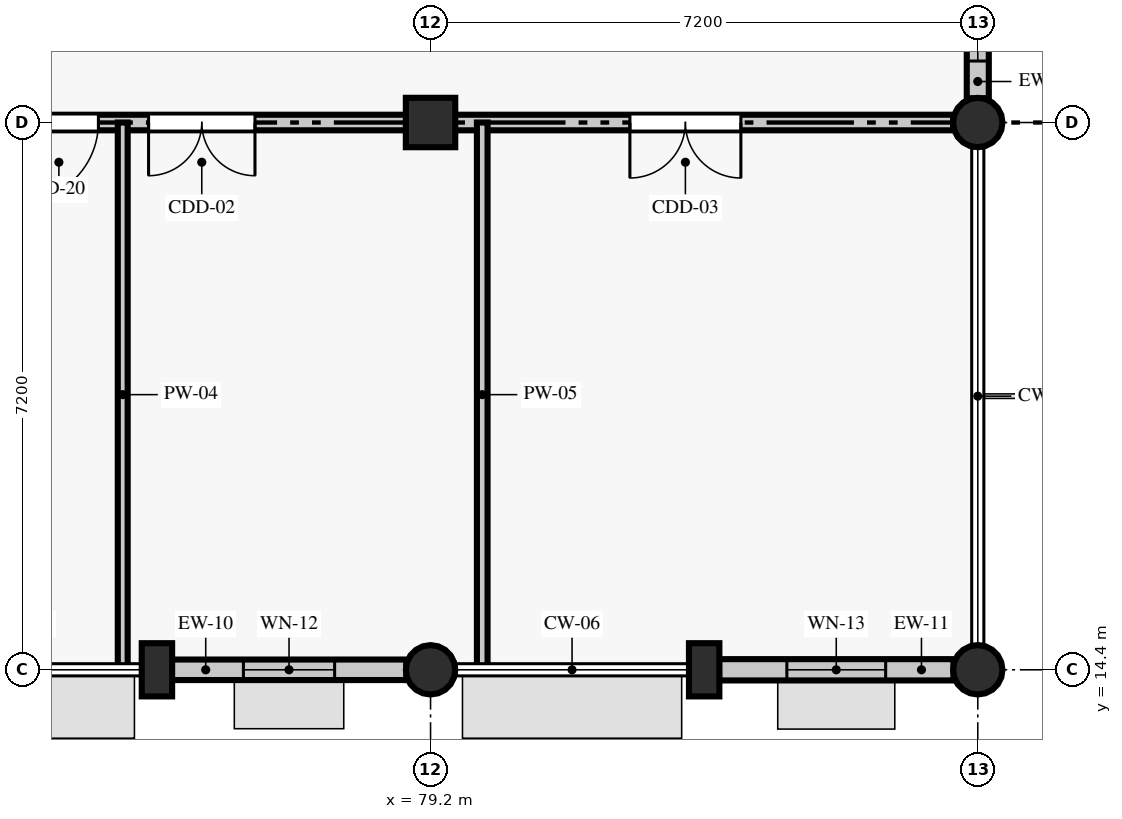
"""IFC4 building model, lengths in metres.
Left out: names, types, materials, properties, quantities, classifications, styles, units other than length and angle.
Written with IfcOpenShell. Run it as: python <this file> out.ifc"""

import sys

from ifc_helpers import new_model, si_unit, direction, frame, frame_2d, origin, origin_2d, place, context, subcontext, project, spatial, rectangle, circle, extrude, element, fill, save


model = new_model("IFC4")
c1 = context("Model", 3, precision=1e-05, world=origin(), true_north=direction((0.0, 1.0)))
c2 = subcontext(c1, "Body", "Model", "MODEL_VIEW")
j1 = project(units=[si_unit("LENGTHUNIT", "METRE"), si_unit("PLANEANGLEUNIT", "RADIAN")], contexts=[c1])
p1 = place(None, origin())
s1 = spatial("IfcSite", under=j1, at=p1, CompositionType="ELEMENT")
p2 = place(p1, origin())
s2 = spatial("IfcBuilding", under=s1, at=p2, CompositionType="ELEMENT")
p3 = place(p2, origin())
s3 = spatial("IfcBuildingStorey", under=s2, at=p3, CompositionType="ELEMENT", Elevation=0.0)
p4 = place(p3, frame((79.2, 14.4, 0.0), z_axis=(0.0, 0.0, 1.0), x_axis=(1.0, 0.0, 0.0)))
e1 = element("IfcColumn", 1, at=p4, inside=s3, PredefinedType="COLUMN", context=c2, shape_type="SweptSolid", body=[
    extrude(circle(Radius=0.325, at=origin_2d()), origin(), (0.0, 0.0, 1.0), 4.51),
])
p5 = place(p3, frame((79.2, 21.6, 0.0), z_axis=(0.0, 0.0, 1.0), x_axis=(1.0, 0.0, 0.0)))
e2 = element("IfcColumn", 2, at=p5, inside=s3, PredefinedType="COLUMN", context=c2, shape_type="SweptSolid", body=[
    extrude(rectangle(XDim=0.65, YDim=0.65, at=origin_2d()), origin(), (0.0, 0.0, 1.0), 4.51),
])
for number, where, z_axis, x_axis in (
    (3, (86.4, 14.4, 0.0), (0.0, 0.0, 1.0), (1.0, 0.0, 0.0)),
    (4, (86.4, 21.6, 0.0), (0.0, 0.0, 1.0), (1.0, 0.0, 0.0)),
):
    element("IfcColumn", number, at=place(p3, frame(where, z_axis=z_axis, x_axis=x_axis)), inside=s3, PredefinedType="COLUMN", context=c2, shape_type="SweptSolid", body=[
        extrude(circle(Radius=0.325, at=origin_2d()), origin(), (0.0, 0.0, 1.0), 4.51),
    ])
for number, where, z_axis, x_axis in (
    (5, (75.6, 14.4, 0.0), (0.0, 0.0, 1.0), (1.0, 0.0, 0.0)),
    (6, (82.8, 14.4, 0.0), (0.0, 0.0, 1.0), (1.0, 0.0, 0.0)),
):
    element("IfcColumn", number, at=place(p3, frame(where, z_axis=z_axis, x_axis=x_axis)), inside=s3, PredefinedType="PILASTER", context=c2, shape_type="SweptSolid", body=[
        extrude(rectangle(XDim=0.4, YDim=0.7, at=origin_2d()), origin(), (0.0, 0.0, 1.0), 4.51),
    ])
p6 = place(p3, frame((75.796, 14.4, 0.0), z_axis=(0.0, 0.0, 1.0), x_axis=(1.0, 0.0, 0.0)))
e7 = element("IfcWall", 7, at=p6, inside=s3, PredefinedType="STANDARD", context=c2, shape_type="SweptSolid", body=[
    extrude(rectangle(XDim=3.084, YDim=0.27, at=frame_2d((1.542, 0.0))), origin(), (0.0, 0.0, 1.0), 2.9),
])
p7 = place(p6, frame((0.942, 0.0, 0.9)))
e8 = element("IfcOpeningElement", 8, at=p7, cuts=e7, PredefinedType="OPENING", context=c2, shape_type="SweptSolid", body=[
    extrude(rectangle(XDim=1.2, YDim=1.42, at=frame_2d((0.6, 0.71))), frame((0.0, 0.145, 0.0), z_axis=(0.0, -1.0, 0.0), x_axis=(1.0, 0.0, 0.0)), (0.0, 0.0, 1.0), 0.29),
])
p8 = place(p3, frame((82.996, 14.4, 0.0), z_axis=(0.0, 0.0, 1.0), x_axis=(1.0, 0.0, 0.0)))
e9 = element("IfcWall", 9, at=p8, inside=s3, PredefinedType="STANDARD", context=c2, shape_type="SweptSolid", body=[
    extrude(rectangle(XDim=3.084, YDim=0.28, at=frame_2d((1.542, 0.0))), origin(), (0.0, 0.0, 1.0), 3.86),
])
p9 = place(p8, frame((0.892, 0.0, 0.9)))
e10 = element("IfcOpeningElement", 10, at=p9, cuts=e9, PredefinedType="OPENING", context=c2, shape_type="SweptSolid", body=[
    extrude(rectangle(XDim=1.3, YDim=1.42, at=frame_2d((0.65, 0.71))), frame((0.0, 0.15, 0.0), z_axis=(0.0, -1.0, 0.0), x_axis=(1.0, 0.0, 0.0)), (0.0, 0.0, 1.0), 0.3),
])
p10 = place(p3, frame((86.4, 21.92, 0.0), z_axis=(0.0, 0.0, 1.0), x_axis=(0.0, 1.0, 0.0)))
e11 = element("IfcWall", 11, at=p10, inside=s3, PredefinedType="STANDARD", context=c2, shape_type="SweptSolid", body=[
    extrude(rectangle(XDim=2.378, YDim=0.29, at=frame_2d((1.189, 0.0))), origin(), (0.0, 0.0, 1.0), 4.51),
])
p11 = place(p10, frame((0.489, 0.0, 0.9)))
e12 = element("IfcOpeningElement", 12, at=p11, cuts=e11, PredefinedType="OPENING", context=c2, shape_type="SweptSolid", body=[
    extrude(rectangle(XDim=1.4, YDim=1.42, at=frame_2d((0.7, 0.71))), frame((0.0, 0.155, 0.0), z_axis=(0.0, -1.0, 0.0), x_axis=(1.0, 0.0, 0.0)), (0.0, 0.0, 1.0), 0.31),
])
p12 = place(p3, frame((50.725, 21.6, 0.0), z_axis=(0.0, 0.0, 1.0), x_axis=(1.0, 0.0, 0.0)))
e13 = element("IfcWall", 13, at=p12, inside=s3, PredefinedType="PARTITIONING", context=c2, shape_type="SweptSolid", body=[
    extrude(rectangle(XDim=35.35, YDim=0.205, at=frame_2d((17.675, 0.0))), origin(), (0.0, 0.0, 1.0), 3.66),
])
p13 = place(p12, frame((2.544, 0.0, 0.0)))
e14 = element("IfcOpeningElement", 14, at=p13, cuts=e13, PredefinedType="OPENING", context=c2, shape_type="SweptSolid", body=[
    extrude(rectangle(XDim=1.34, YDim=2.14, at=frame_2d((0.67, 1.07))), frame((0.0, 0.113, 0.0), z_axis=(0.0, -1.0, 0.0), x_axis=(1.0, 0.0, 0.0)), (0.0, 0.0, 1.0), 0.225),
])
p14 = place(p12, frame((10.122, 0.0, 0.0)))
e15 = element("IfcOpeningElement", 15, at=p14, cuts=e13, PredefinedType="OPENING", context=c2, shape_type="SweptSolid", body=[
    extrude(rectangle(XDim=1.08, YDim=2.18, at=frame_2d((0.54, 1.09))), frame((0.0, 0.113, 0.0), z_axis=(0.0, -1.0, 0.0), x_axis=(1.0, 0.0, 0.0)), (0.0, 0.0, 1.0), 0.225),
])
p15 = place(p12, frame((15.055, 0.0, 0.0)))
e16 = element("IfcOpeningElement", 16, at=p15, cuts=e13, PredefinedType="OPENING", context=c2, shape_type="SweptSolid", body=[
    extrude(rectangle(XDim=0.92, YDim=2.18, at=frame_2d((0.46, 1.09))), frame((0.0, 0.113, 0.0), z_axis=(0.0, -1.0, 0.0), x_axis=(1.0, 0.0, 0.0)), (0.0, 0.0, 1.0), 0.225),
])
p16 = place(p12, frame((17.215, 0.0, 0.0)))
e17 = element("IfcOpeningElement", 17, at=p16, cuts=e13, PredefinedType="OPENING", context=c2, shape_type="SweptSolid", body=[
    extrude(rectangle(XDim=0.94, YDim=2.08, at=frame_2d((0.47, 1.04))), frame((0.0, 0.113, 0.0), z_axis=(0.0, -1.0, 0.0), x_axis=(1.0, 0.0, 0.0)), (0.0, 0.0, 1.0), 0.225),
])
p17 = place(p12, frame((19.465, 0.0, 0.0)))
e18 = element("IfcOpeningElement", 18, at=p17, cuts=e13, PredefinedType="OPENING", context=c2, shape_type="SweptSolid", body=[
    extrude(rectangle(XDim=0.9, YDim=2.08, at=frame_2d((0.45, 1.04))), frame((0.0, 0.113, 0.0), z_axis=(0.0, -1.0, 0.0), x_axis=(1.0, 0.0, 0.0)), (0.0, 0.0, 1.0), 0.225),
])
p18 = place(p12, frame((23.065, 0.0, 0.0)))
e19 = element("IfcOpeningElement", 19, at=p18, cuts=e13, PredefinedType="OPENING", context=c2, shape_type="SweptSolid", body=[
    extrude(rectangle(XDim=1.04, YDim=2.23, at=frame_2d((0.52, 1.115))), frame((0.0, 0.113, 0.0), z_axis=(0.0, -1.0, 0.0), x_axis=(1.0, 0.0, 0.0)), (0.0, 0.0, 1.0), 0.225),
])
p19 = place(p12, frame((24.765, 0.0, 0.0)))
e20 = element("IfcOpeningElement", 20, at=p19, cuts=e13, PredefinedType="OPENING", context=c2, shape_type="SweptSolid", body=[
    extrude(rectangle(XDim=1.4, YDim=2.16, at=frame_2d((0.7, 1.08))), frame((0.0, 0.113, 0.0), z_axis=(0.0, -1.0, 0.0), x_axis=(1.0, 0.0, 0.0)), (0.0, 0.0, 1.0), 0.225),
])
p20 = place(p12, frame((31.098, 0.0, 0.0)))
e21 = element("IfcOpeningElement", 21, at=p20, cuts=e13, PredefinedType="OPENING", context=c2, shape_type="SweptSolid", body=[
    extrude(rectangle(XDim=1.46, YDim=2.18, at=frame_2d((0.73, 1.09))), frame((0.0, 0.113, 0.0), z_axis=(0.0, -1.0, 0.0), x_axis=(1.0, 0.0, 0.0)), (0.0, 0.0, 1.0), 0.225),
])
p21 = place(p3, frame((75.15, 14.44, 0.0), z_axis=(0.0, 0.0, 1.0), x_axis=(0.0, 1.0, 0.0)))
e22 = element("IfcWall", 22, at=p21, inside=s3, PredefinedType="PARTITIONING", context=c2, shape_type="SweptSolid", body=[
    extrude(rectangle(XDim=7.16, YDim=0.13, at=frame_2d((3.58, 0.0))), origin(), (0.0, 0.0, 1.0), 3.66),
])
p22 = place(p3, frame((79.88, 14.44, 0.0), z_axis=(0.0, 0.0, 1.0), x_axis=(0.0, 1.0, 0.0)))
e23 = element("IfcWall", 23, at=p22, inside=s3, PredefinedType="PARTITIONING", context=c2, shape_type="SweptSolid", body=[
    extrude(rectangle(XDim=7.16, YDim=0.14, at=frame_2d((3.58, 0.0))), origin(), (0.0, 0.0, 1.0), 3.66),
])
p23 = place(p7, origin())
e24 = element("IfcWindow", 24, at=p23, inside=s3, PartitioningType="SINGLE_PANEL", PredefinedType="WINDOW", context=c2, shape_type="SweptSolid", body=[
    extrude(rectangle(XDim=1.2, YDim=1.42, at=frame_2d((0.6, 0.71))), frame((0.0, 0.03, 0.0), z_axis=(0.0, -1.0, 0.0), x_axis=(1.0, 0.0, 0.0)), (0.0, 0.0, 1.0), 0.06),
])
fill(e8, e24)
p24 = place(p9, origin())
e25 = element("IfcWindow", 25, at=p24, inside=s3, PartitioningType="SINGLE_PANEL", PredefinedType="WINDOW", context=c2, shape_type="SweptSolid", body=[
    extrude(rectangle(XDim=1.3, YDim=1.42, at=frame_2d((0.65, 0.71))), frame((0.0, 0.03, 0.0), z_axis=(0.0, -1.0, 0.0), x_axis=(1.0, 0.0, 0.0)), (0.0, 0.0, 1.0), 0.06),
])
fill(e10, e25)
p25 = place(p11, origin())
e26 = element("IfcWindow", 26, at=p25, inside=s3, PartitioningType="SINGLE_PANEL", PredefinedType="WINDOW", context=c2, shape_type="SweptSolid", body=[
    extrude(rectangle(XDim=1.4, YDim=1.42, at=frame_2d((0.7, 0.71))), frame((0.0, 0.03, 0.0), z_axis=(0.0, -1.0, 0.0), x_axis=(1.0, 0.0, 0.0)), (0.0, 0.0, 1.0), 0.06),
])
fill(e12, e26)
p26 = place(p18, frame((1.04, 0.0, 0.0), z_axis=(0.0, 0.0, 1.0), x_axis=(-1.0, 0.0, 0.0)))
e27 = element("IfcDoor", 27, at=p26, inside=s3, OperationType="SINGLE_SWING_RIGHT", PredefinedType="DOOR", context=c2, shape_type="SweptSolid", body=[
    extrude(rectangle(XDim=1.04, YDim=2.23, at=frame_2d((0.52, 1.115))), frame((0.0, 0.025, 0.0), z_axis=(0.0, -1.0, 0.0), x_axis=(1.0, 0.0, 0.0)), (0.0, 0.0, 1.0), 0.05),
])
fill(e19, e27)
p27 = place(p19, frame((1.4, 0.0, 0.0), z_axis=(0.0, 0.0, 1.0), x_axis=(-1.0, 0.0, 0.0)))
e28 = element("IfcDoor", 28, at=p27, inside=s3, OperationType="DOUBLE_DOOR_SINGLE_SWING", PredefinedType="DOOR", context=c2, shape_type="SweptSolid", body=[
    extrude(rectangle(XDim=1.4, YDim=2.16, at=frame_2d((0.7, 1.08))), frame((0.0, 0.025, 0.0), z_axis=(0.0, -1.0, 0.0), x_axis=(1.0, 0.0, 0.0)), (0.0, 0.0, 1.0), 0.05),
])
fill(e20, e28)
p28 = place(p20, frame((1.46, 0.0, 0.0), z_axis=(0.0, 0.0, 1.0), x_axis=(-1.0, 0.0, 0.0)))
e29 = element("IfcDoor", 29, at=p28, inside=s3, OperationType="DOUBLE_DOOR_SINGLE_SWING", PredefinedType="DOOR", context=c2, shape_type="SweptSolid", body=[
    extrude(rectangle(XDim=1.46, YDim=2.18, at=frame_2d((0.73, 1.09))), frame((0.0, 0.025, 0.0), z_axis=(0.0, -1.0, 0.0), x_axis=(1.0, 0.0, 0.0)), (0.0, 0.0, 1.0), 0.05),
])
fill(e21, e29)
save(model, sys.argv[1])
